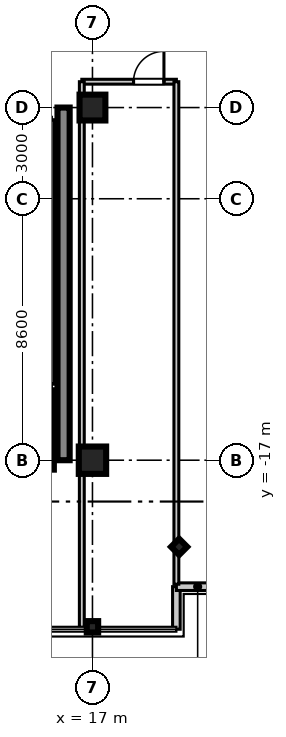
"""IFC4 building model, lengths in metres.
Left out: names, types, materials, properties, quantities, classifications, styles, units other than length and angle.
Written with IfcOpenShell. Run it as: python <this file> out.ifc"""

import sys

from ifc_helpers import new_model, si_unit, direction, frame, frame_2d, origin, origin_2d, place, context, subcontext, project, spatial, rectangle, i_section, extrude, source, transform, mapped, element, fill, save


model = new_model("IFC4")
c1 = context("Model", 3, precision=1e-05, world=origin(), true_north=direction((0.0, 1.0)))
c2 = subcontext(c1, "Body", "Model", "MODEL_VIEW")
j1 = project(units=[si_unit("LENGTHUNIT", "METRE"), si_unit("PLANEANGLEUNIT", "RADIAN")], contexts=[c1])
p1 = place(None, origin())
s1 = spatial("IfcSite", under=j1, at=p1, CompositionType="ELEMENT")
p2 = place(p1, origin())
s2 = spatial("IfcBuilding", under=s1, at=p2, CompositionType="ELEMENT")
p3 = place(p2, frame((0.0, 0.0, 319.55)))
s3 = spatial("IfcBuildingStorey", under=s2, at=p3, CompositionType="ELEMENT", Elevation=319.55)
m1 = source(origin(), c2, "Body", "SweptSolid", [
    extrude(rectangle(XDim=0.9, YDim=0.9, at=origin_2d()), origin(), (0.0, 0.0, 1.0), 3.755),
])
p4 = place(p3, frame((17.0, -17.0, 0.0), z_axis=(0.0, 0.0, 1.0), x_axis=(1.0, 0.0, 0.0)))
e1 = element("IfcColumn", 1, at=p4, inside=s3, PredefinedType="COLUMN", context=c2, shape_type="MappedRepresentation", body=[
    mapped(m1, transform((0.0, 0.0, 0.0), scale=1.0)),
])
m2 = source(origin(), c2, "Body", "SweptSolid", [
    extrude(rectangle(XDim=0.85, YDim=0.85, at=origin_2d()), origin(), (0.0, 0.0, 1.0), 3.755),
])
p5 = place(p3, frame((17.0, -5.4, 0.0), z_axis=(0.0, 0.0, 1.0), x_axis=(1.0, 0.0, 0.0)))
e2 = element("IfcColumn", 2, at=p5, inside=s3, PredefinedType="PILASTER", context=c2, shape_type="MappedRepresentation", body=[
    mapped(m2, transform((0.0, 0.0, 0.0), scale=1.0)),
])
m3 = source(origin(), c2, "Body", "SweptSolid", [
    extrude(i_section(OverallWidth=0.374, OverallDepth=0.374, WebThickness=0.014, FlangeThickness=0.023, at=origin_2d()), origin(), (0.0, 0.0, 1.0), 3.755),
])
for number, where, z_axis, x_axis in (
    (3, (17.0, -22.48, 0.0), (0.0, 0.0, 1.0), (0.0, 1.0, 0.0)),
    (4, (19.85, -19.85, 0.0), (0.0, 0.0, 1.0), (0.707, 0.707, 0.0)),
):
    element("IfcColumn", number, at=place(p3, frame(where, z_axis=z_axis, x_axis=x_axis)), inside=s3, PredefinedType="COLUMN", context=c2, shape_type="MappedRepresentation", body=[
        mapped(m3, transform((0.0, 0.0, 0.0), scale=1.0)),
    ])
m4 = source(origin(), c2, "Body", "SweptSolid", [
    extrude(rectangle(XDim=11.6, YDim=0.4, at=frame_2d((5.8, 0.0))), origin(), (0.0, 0.0, 1.0), 3.5),
])
p6 = place(p3, frame((16.05, -17.0, 0.0), z_axis=(0.0, 0.0, 1.0), x_axis=(0.0, 1.0, 0.0)))
e5 = element("IfcWall", 5, at=p6, inside=s3, PredefinedType="SHEAR", context=c2, shape_type="MappedRepresentation", body=[
    mapped(m4, transform((0.0, 0.0, 0.0), scale=1.0)),
])
m5 = source(origin(), c2, "Body", "SweptSolid", [
    extrude(rectangle(XDim=2.61, YDim=0.22, at=frame_2d((1.305, 0.0))), origin(), (0.0, 0.0, 1.0), 3.5),
])
p7 = place(p3, frame((15.62, -17.31, 0.0), z_axis=(0.0, 0.0, 1.0), x_axis=(0.0, 1.0, 0.0)))
e6 = element("IfcWall", 6, at=p7, inside=s3, PredefinedType="SHEAR", context=c2, shape_type="MappedRepresentation", body=[
    mapped(m5, transform((0.0, 0.0, 0.0), scale=1.0)),
])
m6 = source(origin(), c2, "Body", "SweptSolid", [
    extrude(rectangle(XDim=1.4, YDim=0.25, at=frame_2d((0.7, 0.0))), origin(), (0.0, 0.0, 1.0), 3.5),
])
p8 = place(p3, frame((19.76, -22.56, 0.0), z_axis=(0.0, 0.0, 1.0), x_axis=(0.0, 1.0, 0.0)))
e7 = element("IfcWall", 7, at=p8, inside=s3, PredefinedType="STANDARD", context=c2, shape_type="MappedRepresentation", body=[
    mapped(m6, transform((0.0, 0.0, 0.0), scale=1.0)),
])
m7 = source(origin(), c2, "Body", "SweptSolid", [
    extrude(rectangle(XDim=1.4, YDim=0.25, at=frame_2d((0.7, 0.0))), origin(), (0.0, 0.0, 1.0), 3.5),
])
p9 = place(p3, frame((19.76, -21.16, 0.0), z_axis=(0.0, 0.0, 1.0), x_axis=(1.0, 0.0, 0.0)))
e8 = element("IfcWall", 8, at=p9, inside=s3, PredefinedType="STANDARD", context=c2, shape_type="MappedRepresentation", body=[
    mapped(m7, transform((0.0, 0.0, 0.0), scale=1.0)),
])
m8 = source(origin(), c2, "Body", "SweptSolid", [
    extrude(rectangle(XDim=8.7, YDim=0.16, at=frame_2d((4.35, 0.0))), origin(), (0.0, 0.0, 1.0), 2.84),
])
p10 = place(p3, frame((15.65, -14.5, 0.0), z_axis=(0.0, 0.0, 1.0), x_axis=(0.0, 1.0, 0.0)))
e9 = element("IfcWall", 9, at=p10, inside=s3, PredefinedType="PARTITIONING", context=c2, shape_type="MappedRepresentation", body=[
    mapped(m8, transform((0.0, 0.0, 0.0), scale=1.0)),
])
m9 = source(origin(), c2, "Body", "SweptSolid", [
    extrude(rectangle(XDim=3.11, YDim=0.16, at=frame_2d((1.555, 0.0))), origin(), (0.0, 0.0, 1.0), 2.84),
])
p11 = place(p3, frame((16.65, -4.55, 0.0), z_axis=(0.0, 0.0, 1.0), x_axis=(1.0, 0.0, 0.0)))
e10 = element("IfcWall", 10, at=p11, inside=s3, PredefinedType="PARTITIONING", context=c2, shape_type="MappedRepresentation", body=[
    mapped(m9, transform((0.0, 0.0, 0.0), scale=1.0)),
])
p12 = place(p11, frame((1.701, 0.0, 0.0)))
e11 = element("IfcOpeningElement", 11, at=p12, cuts=e10, PredefinedType="OPENING", context=c2, shape_type="SweptSolid", body=[
    extrude(rectangle(XDim=1.0, YDim=2.1, at=frame_2d((0.5, 1.05))), frame((0.0, 0.09, 0.0), z_axis=(0.0, -1.0, 0.0), x_axis=(1.0, 0.0, 0.0)), (0.0, 0.0, 1.0), 0.18),
])
m10 = source(origin(), c2, "Body", "SweptSolid", [
    extrude(rectangle(XDim=17.95, YDim=0.16, at=frame_2d((8.975, 0.0))), origin(), (0.0, 0.0, 1.0), 2.84),
])
p13 = place(p3, frame((16.65, -22.5, 0.0), z_axis=(0.0, 0.0, 1.0), x_axis=(0.0, 1.0, 0.0)))
e12 = element("IfcWall", 12, at=p13, inside=s3, PredefinedType="PARTITIONING", context=c2, shape_type="MappedRepresentation", body=[
    mapped(m10, transform((0.0, 0.0, 0.0), scale=1.0)),
])
m11 = source(origin(), c2, "Body", "SweptSolid", [
    extrude(rectangle(XDim=16.53, YDim=0.16, at=frame_2d((8.265, 0.0))), origin(), (0.0, 0.0, 1.0), 2.84),
])
p14 = place(p3, frame((19.76, -21.08, 0.0), z_axis=(0.0, 0.0, 1.0), x_axis=(0.0, 1.0, 0.0)))
e13 = element("IfcWall", 13, at=p14, inside=s3, PredefinedType="PARTITIONING", context=c2, shape_type="MappedRepresentation", body=[
    mapped(m11, transform((0.0, 0.0, 0.0), scale=1.0)),
])
m12 = source(origin(), c2, "Body", "SweptSolid", [
    extrude(rectangle(XDim=1.0, YDim=2.1, at=frame_2d((0.5, 1.05))), frame((0.0, 0.025, 0.0), z_axis=(0.0, -1.0, 0.0), x_axis=(1.0, 0.0, 0.0)), (0.0, 0.0, 1.0), 0.05),
])
p15 = place(p12, frame((1.0, 0.0, 0.0), z_axis=(0.0, 0.0, 1.0), x_axis=(-1.0, 0.0, 0.0)))
e14 = element("IfcDoor", 14, at=p15, inside=s3, OperationType="SINGLE_SWING_RIGHT", PredefinedType="DOOR", context=c2, shape_type="MappedRepresentation", body=[
    mapped(m12, transform((0.0, 0.0, 0.0), scale=1.0)),
])
fill(e11, e14)
save(model, sys.argv[1])
